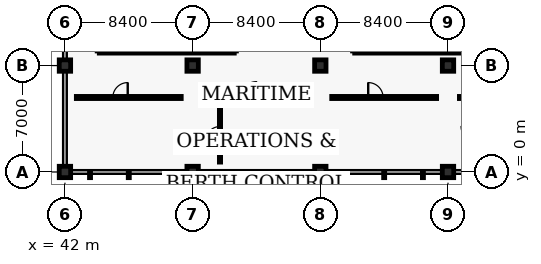
"""IFC4 building model, lengths in metres.
Left out: names, types, materials, properties, quantities, classifications, styles, units other than length and angle.
Written with IfcOpenShell. Run it as: python <this file> out.ifc"""

import sys

from ifc_helpers import new_model, si_unit, direction, frame, frame_2d, origin, origin_2d, place, context, subcontext, project, spatial, rectangle, extrude, element, fill, save


model = new_model("IFC4")
c1 = context("Model", 3, precision=1e-05, world=origin(), true_north=direction((0.0, 1.0)))
c2 = subcontext(c1, "Body", "Model", "MODEL_VIEW")
j1 = project(units=[si_unit("LENGTHUNIT", "METRE"), si_unit("PLANEANGLEUNIT", "RADIAN")], contexts=[c1])
p1 = place(None, origin())
s1 = spatial("IfcSite", under=j1, at=p1, CompositionType="ELEMENT")
p2 = place(p1, origin())
s2 = spatial("IfcBuilding", under=s1, at=p2, CompositionType="ELEMENT")
p3 = place(p2, frame((0.0, 0.0, 9.6)))
s3 = spatial("IfcBuildingStorey", under=s2, at=p3, CompositionType="ELEMENT", Elevation=9.6)
for number, where, z_axis, x_axis in (
    (1, (42.0, 0.0, 0.0), (0.0, 0.0, 1.0), (1.0, 0.0, 0.0)),
    (2, (42.0, 7.0, 0.0), (0.0, 0.0, 1.0), (1.0, 0.0, 0.0)),
    (3, (50.4, 0.0, 0.0), (0.0, 0.0, 1.0), (1.0, 0.0, 0.0)),
    (4, (50.4, 7.0, 0.0), (0.0, 0.0, 1.0), (1.0, 0.0, 0.0)),
    (5, (58.8, 0.0, 0.0), (0.0, 0.0, 1.0), (1.0, 0.0, 0.0)),
    (6, (58.8, 7.0, 0.0), (0.0, 0.0, 1.0), (1.0, 0.0, 0.0)),
    (7, (67.2, 0.0, 0.0), (0.0, 0.0, 1.0), (1.0, 0.0, 0.0)),
    (8, (67.2, 7.0, 0.0), (0.0, 0.0, 1.0), (1.0, 0.0, 0.0)),
):
    element("IfcColumn", number, at=place(p3, frame(where, z_axis=z_axis, x_axis=x_axis)), inside=s3, PredefinedType="COLUMN", context=c2, shape_type="SweptSolid", body=[
        extrude(rectangle(XDim=0.75, YDim=0.75, at=origin_2d()), origin(), (0.0, 0.0, 1.0), 3.52),
    ])
for number, where, z_axis, x_axis in (
    (9, (44.26, 7.96, 0.0), (0.0, 0.0, 1.0), (1.0, 0.0, 0.0)),
    (10, (61.06, 7.96, 0.0), (0.0, 0.0, 1.0), (1.0, 0.0, 0.0)),
):
    element("IfcWall", number, at=place(p3, frame(where, z_axis=z_axis, x_axis=x_axis)), inside=s3, PredefinedType="SHEAR", context=c2, shape_type="SweptSolid", body=[
        extrude(rectangle(XDim=8.88, YDim=0.28, at=frame_2d((4.44, 0.0))), origin(), (0.0, 0.0, 1.0), 3.52),
    ])
p4 = place(p3, frame((42.75, 4.9, 0.0), z_axis=(0.0, 0.0, 1.0), x_axis=(1.0, 0.0, 0.0)))
e11 = element("IfcWall", 11, at=p4, inside=s3, PredefinedType="PARTITIONING", context=c2, shape_type="SweptSolid", body=[
    extrude(rectangle(XDim=6.9, YDim=0.14, at=frame_2d((3.45, 0.0))), origin(), (0.0, 0.0, 1.0), 2.55),
])
p5 = place(p4, frame((2.4, 0.0, 0.0)))
e12 = element("IfcOpeningElement", 12, at=p5, cuts=e11, PredefinedType="OPENING", context=c2, shape_type="SweptSolid", body=[
    extrude(rectangle(XDim=0.98, YDim=2.12, at=frame_2d((0.49, 1.06))), frame((0.0, 0.08, 0.0), z_axis=(0.0, -1.0, 0.0), x_axis=(1.0, 0.0, 0.0)), (0.0, 0.0, 1.0), 0.16),
])
p6 = place(p3, frame((51.15, 4.9, 0.0), z_axis=(0.0, 0.0, 1.0), x_axis=(1.0, 0.0, 0.0)))
e13 = element("IfcWall", 13, at=p6, inside=s3, PredefinedType="PARTITIONING", context=c2, shape_type="SweptSolid", body=[
    extrude(rectangle(XDim=6.9, YDim=0.14, at=frame_2d((3.45, 0.0))), origin(), (0.0, 0.0, 1.0), 2.55),
])
p7 = place(p6, frame((2.4, 0.0, 0.0)))
e14 = element("IfcOpeningElement", 14, at=p7, cuts=e13, PredefinedType="OPENING", context=c2, shape_type="SweptSolid", body=[
    extrude(rectangle(XDim=1.04, YDim=2.14, at=frame_2d((0.52, 1.07))), frame((0.0, 0.08, 0.0), z_axis=(0.0, -1.0, 0.0), x_axis=(1.0, 0.0, 0.0)), (0.0, 0.0, 1.0), 0.16),
])
p8 = place(p3, frame((52.2, 0.65, 0.0), z_axis=(0.0, 0.0, 1.0), x_axis=(0.0, 1.0, 0.0)))
e15 = element("IfcWall", 15, at=p8, inside=s3, PredefinedType="PARTITIONING", context=c2, shape_type="SweptSolid", body=[
    extrude(rectangle(XDim=4.1, YDim=0.08, at=frame_2d((2.05, 0.0))), origin(), (0.0, 0.0, 1.0), 2.5),
])
p9 = place(p8, frame((1.4, 0.0, 0.0)))
e16 = element("IfcOpeningElement", 16, at=p9, cuts=e15, PredefinedType="OPENING", context=c2, shape_type="SweptSolid", body=[
    extrude(rectangle(XDim=0.94, YDim=2.08, at=frame_2d((0.47, 1.04))), frame((0.0, 0.05, 0.0), z_axis=(0.0, -1.0, 0.0), x_axis=(1.0, 0.0, 0.0)), (0.0, 0.0, 1.0), 0.1),
])
p10 = place(p3, frame((59.55, 4.9, 0.0), z_axis=(0.0, 0.0, 1.0), x_axis=(1.0, 0.0, 0.0)))
e17 = element("IfcWall", 17, at=p10, inside=s3, PredefinedType="PARTITIONING", context=c2, shape_type="SweptSolid", body=[
    extrude(rectangle(XDim=6.9, YDim=0.14, at=frame_2d((3.45, 0.0))), origin(), (0.0, 0.0, 1.0), 2.55),
])
p11 = place(p10, frame((2.4, 0.0, 0.0)))
e18 = element("IfcOpeningElement", 18, at=p11, cuts=e17, PredefinedType="OPENING", context=c2, shape_type="SweptSolid", body=[
    extrude(rectangle(XDim=0.98, YDim=2.12, at=frame_2d((0.49, 1.06))), frame((0.0, 0.08, 0.0), z_axis=(0.0, -1.0, 0.0), x_axis=(1.0, 0.0, 0.0)), (0.0, 0.0, 1.0), 0.16),
])
p12 = place(p3, frame((67.95, 4.9, 0.0), z_axis=(0.0, 0.0, 1.0), x_axis=(1.0, 0.0, 0.0)))
e19 = element("IfcWall", 19, at=p12, inside=s3, PredefinedType="PARTITIONING", context=c2, shape_type="SweptSolid", body=[
    extrude(rectangle(XDim=6.9, YDim=0.14, at=frame_2d((3.45, 0.0))), origin(), (0.0, 0.0, 1.0), 2.55),
])
p13 = place(p12, frame((2.4, 0.0, 0.0)))
e20 = element("IfcOpeningElement", 20, at=p13, cuts=e19, PredefinedType="OPENING", context=c2, shape_type="SweptSolid", body=[
    extrude(rectangle(XDim=1.04, YDim=2.14, at=frame_2d((0.52, 1.07))), frame((0.0, 0.08, 0.0), z_axis=(0.0, -1.0, 0.0), x_axis=(1.0, 0.0, 0.0)), (0.0, 0.0, 1.0), 0.16),
])
p14 = place(p5, origin())
e21 = element("IfcDoor", 21, at=p14, inside=s3, OperationType="SINGLE_SWING_RIGHT", PredefinedType="DOOR", context=c2, shape_type="SweptSolid", body=[
    extrude(rectangle(XDim=0.98, YDim=2.12, at=frame_2d((0.49, 1.06))), frame((0.0, 0.025, 0.0), z_axis=(0.0, -1.0, 0.0), x_axis=(1.0, 0.0, 0.0)), (0.0, 0.0, 1.0), 0.05),
])
fill(e12, e21)
p15 = place(p7, origin())
e22 = element("IfcDoor", 22, at=p15, inside=s3, OperationType="SINGLE_SWING_RIGHT", PredefinedType="DOOR", context=c2, shape_type="SweptSolid", body=[
    extrude(rectangle(XDim=1.04, YDim=2.14, at=frame_2d((0.52, 1.07))), frame((0.0, 0.025, 0.0), z_axis=(0.0, -1.0, 0.0), x_axis=(1.0, 0.0, 0.0)), (0.0, 0.0, 1.0), 0.05),
])
fill(e14, e22)
p16 = place(p9, origin())
e23 = element("IfcDoor", 23, at=p16, inside=s3, OperationType="SINGLE_SWING_LEFT", PredefinedType="DOOR", context=c2, shape_type="SweptSolid", body=[
    extrude(rectangle(XDim=0.94, YDim=2.08, at=frame_2d((0.47, 1.04))), frame((0.0, 0.025, 0.0), z_axis=(0.0, -1.0, 0.0), x_axis=(1.0, 0.0, 0.0)), (0.0, 0.0, 1.0), 0.05),
])
fill(e16, e23)
p17 = place(p11, origin())
e24 = element("IfcDoor", 24, at=p17, inside=s3, OperationType="SINGLE_SWING_LEFT", PredefinedType="DOOR", context=c2, shape_type="SweptSolid", body=[
    extrude(rectangle(XDim=0.98, YDim=2.12, at=frame_2d((0.49, 1.06))), frame((0.0, 0.025, 0.0), z_axis=(0.0, -1.0, 0.0), x_axis=(1.0, 0.0, 0.0)), (0.0, 0.0, 1.0), 0.05),
])
fill(e18, e24)
save(model, sys.argv[1])
